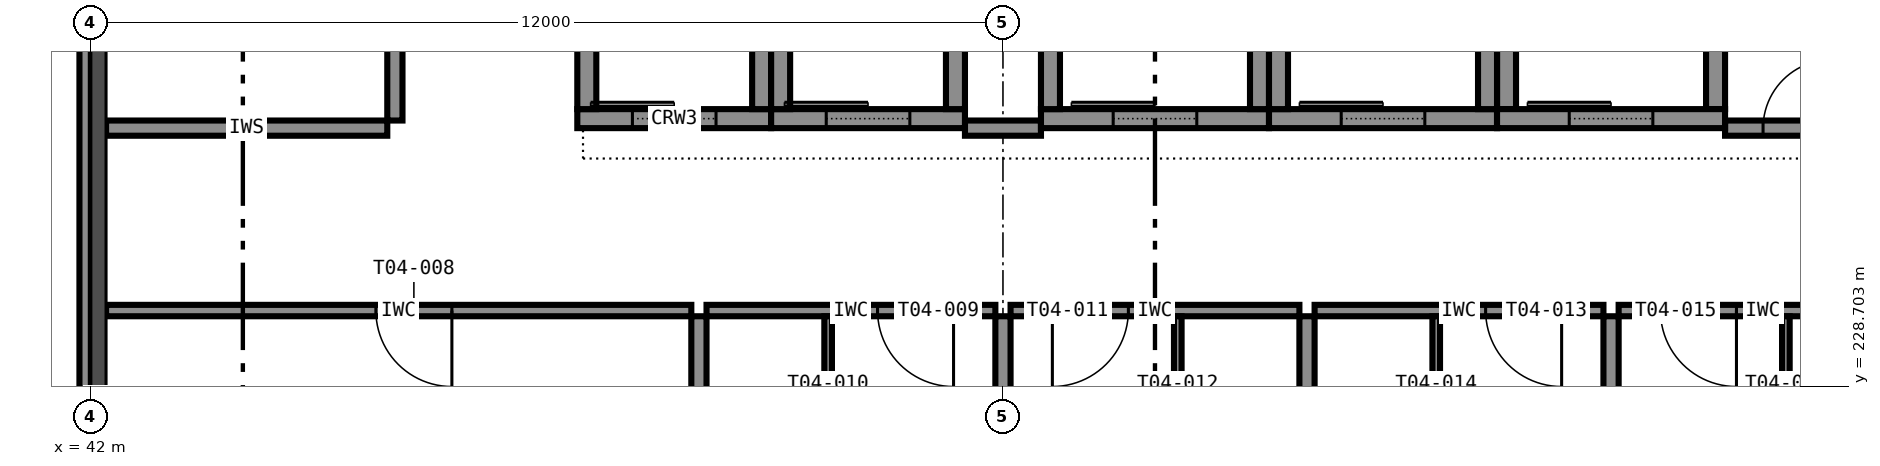
"""IFC4 building model, lengths in metres.
Left out: names, types, materials, properties, quantities, classifications, styles, units other than length and angle.
Written with IfcOpenShell. Run it as: python <this file> out.ifc"""

import sys

from ifc_helpers import new_model, si_unit, direction, frame, frame_2d, origin, place, context, subcontext, project, spatial, rectangle, extrude, element, fill, save


model = new_model("IFC4")
c1 = context("Model", 3, precision=1e-05, world=origin(), true_north=direction((0.0, 1.0)))
c2 = subcontext(c1, "Body", "Model", "MODEL_VIEW")
j1 = project(units=[si_unit("LENGTHUNIT", "METRE"), si_unit("PLANEANGLEUNIT", "RADIAN")], contexts=[c1])
p1 = place(None, origin())
s1 = spatial("IfcSite", under=j1, at=p1, CompositionType="ELEMENT")
p2 = place(p1, origin())
s2 = spatial("IfcBuilding", under=s1, at=p2, CompositionType="ELEMENT")
p3 = place(p2, frame((0.0, 0.0, 21.0)))
s3 = spatial("IfcBuildingStorey", under=s2, at=p3, CompositionType="ELEMENT", Elevation=21.0)
p4 = place(p3, frame((54.5, 232.225, 0.0), z_axis=(0.0, 0.0, 1.0), x_axis=(1.0, 0.0, 0.0)))
e1 = element("IfcWall", 1, at=p4, inside=s3, PredefinedType="SHEAR", context=c2, shape_type="SweptSolid", body=[
    extrude(rectangle(XDim=3.0, YDim=0.25, at=frame_2d((1.5, 0.0))), origin(), (0.0, 0.0, 1.0), 3.6),
])
p5 = place(p4, frame((0.95, 0.0, 0.0)))
e2 = element("IfcOpeningElement", 2, at=p5, cuts=e1, PredefinedType="OPENING", context=c2, shape_type="SweptSolid", body=[
    extrude(rectangle(XDim=1.1, YDim=2.1, at=frame_2d((0.55, 1.05))), frame((0.0, 0.135, 0.0), z_axis=(0.0, -1.0, 0.0), x_axis=(1.0, 0.0, 0.0)), (0.0, 0.0, 1.0), 0.27),
])
for number, where, z_axis, x_axis in (
    (3, (54.625, 232.35, 0.0), (0.0, 0.0, 1.0), (0.0, 1.0, 0.0)),
    (4, (57.375, 232.35, 0.0), (0.0, 0.0, 1.0), (0.0, 1.0, 0.0)),
):
    element("IfcWall", number, at=place(p3, frame(where, z_axis=z_axis, x_axis=x_axis)), inside=s3, PredefinedType="SHEAR", context=c2, shape_type="SweptSolid", body=[
        extrude(rectangle(XDim=3.3, YDim=0.25, at=frame_2d((1.65, 0.0))), origin(), (0.0, 0.0, 1.0), 3.6),
    ])
p6 = place(p3, frame((57.5, 232.225, 0.0), z_axis=(0.0, 0.0, 1.0), x_axis=(1.0, 0.0, 0.0)))
e5 = element("IfcWall", 5, at=p6, inside=s3, PredefinedType="SHEAR", context=c2, shape_type="SweptSolid", body=[
    extrude(rectangle(XDim=3.0, YDim=0.25, at=frame_2d((1.5, 0.0))), origin(), (0.0, 0.0, 1.0), 3.6),
])
p7 = place(p6, frame((0.95, 0.0, 0.0)))
e6 = element("IfcOpeningElement", 6, at=p7, cuts=e5, PredefinedType="OPENING", context=c2, shape_type="SweptSolid", body=[
    extrude(rectangle(XDim=1.1, YDim=2.1, at=frame_2d((0.55, 1.05))), frame((0.0, 0.135, 0.0), z_axis=(0.0, -1.0, 0.0), x_axis=(1.0, 0.0, 0.0)), (0.0, 0.0, 1.0), 0.27),
])
for number, where, z_axis, x_axis in (
    (7, (57.625, 232.35, 0.0), (0.0, 0.0, 1.0), (0.0, 1.0, 0.0)),
    (8, (60.375, 232.35, 0.0), (0.0, 0.0, 1.0), (0.0, 1.0, 0.0)),
):
    element("IfcWall", number, at=place(p3, frame(where, z_axis=z_axis, x_axis=x_axis)), inside=s3, PredefinedType="SHEAR", context=c2, shape_type="SweptSolid", body=[
        extrude(rectangle(XDim=3.3, YDim=0.25, at=frame_2d((1.65, 0.0))), origin(), (0.0, 0.0, 1.0), 3.6),
    ])
p8 = place(p3, frame((60.5, 232.225, 0.0), z_axis=(0.0, 0.0, 1.0), x_axis=(1.0, 0.0, 0.0)))
e9 = element("IfcWall", 9, at=p8, inside=s3, PredefinedType="SHEAR", context=c2, shape_type="SweptSolid", body=[
    extrude(rectangle(XDim=3.0, YDim=0.25, at=frame_2d((1.5, 0.0))), origin(), (0.0, 0.0, 1.0), 3.6),
])
p9 = place(p8, frame((0.95, 0.0, 0.0)))
e10 = element("IfcOpeningElement", 10, at=p9, cuts=e9, PredefinedType="OPENING", context=c2, shape_type="SweptSolid", body=[
    extrude(rectangle(XDim=1.1, YDim=2.1, at=frame_2d((0.55, 1.05))), frame((0.0, 0.135, 0.0), z_axis=(0.0, -1.0, 0.0), x_axis=(1.0, 0.0, 0.0)), (0.0, 0.0, 1.0), 0.27),
])
for number, where, z_axis, x_axis in (
    (11, (60.625, 232.35, 0.0), (0.0, 0.0, 1.0), (0.0, 1.0, 0.0)),
    (12, (63.375, 232.35, 0.0), (0.0, 0.0, 1.0), (0.0, 1.0, 0.0)),
):
    element("IfcWall", number, at=place(p3, frame(where, z_axis=z_axis, x_axis=x_axis)), inside=s3, PredefinedType="SHEAR", context=c2, shape_type="SweptSolid", body=[
        extrude(rectangle(XDim=3.3, YDim=0.25, at=frame_2d((1.65, 0.0))), origin(), (0.0, 0.0, 1.0), 3.6),
    ])
p10 = place(p3, frame((48.4, 232.225, 0.0), z_axis=(0.0, 0.0, 1.0), x_axis=(1.0, 0.0, 0.0)))
e13 = element("IfcWall", 13, at=p10, inside=s3, PredefinedType="SHEAR", context=c2, shape_type="SweptSolid", body=[
    extrude(rectangle(XDim=2.55, YDim=0.25, at=frame_2d((1.275, 0.0))), origin(), (0.0, 0.0, 1.0), 3.6),
])
p11 = place(p10, frame((0.725, 0.0, 0.0)))
e14 = element("IfcOpeningElement", 14, at=p11, cuts=e13, PredefinedType="OPENING", context=c2, shape_type="SweptSolid", body=[
    extrude(rectangle(XDim=1.1, YDim=2.1, at=frame_2d((0.55, 1.05))), frame((0.0, 0.135, 0.0), z_axis=(0.0, -1.0, 0.0), x_axis=(1.0, 0.0, 0.0)), (0.0, 0.0, 1.0), 0.27),
])
for number, where, z_axis, x_axis in (
    (15, (48.525, 232.35, 0.0), (0.0, 0.0, 1.0), (0.0, 1.0, 0.0)),
    (16, (50.825, 232.35, 0.0), (0.0, 0.0, 1.0), (0.0, 1.0, 0.0)),
):
    element("IfcWall", number, at=place(p3, frame(where, z_axis=z_axis, x_axis=x_axis)), inside=s3, PredefinedType="SHEAR", context=c2, shape_type="SweptSolid", body=[
        extrude(rectangle(XDim=3.3, YDim=0.25, at=frame_2d((1.65, 0.0))), origin(), (0.0, 0.0, 1.0), 3.6),
    ])
p12 = place(p3, frame((50.95, 232.225, 0.0), z_axis=(0.0, 0.0, 1.0), x_axis=(1.0, 0.0, 0.0)))
e17 = element("IfcWall", 17, at=p12, inside=s3, PredefinedType="SHEAR", context=c2, shape_type="SweptSolid", body=[
    extrude(rectangle(XDim=2.55, YDim=0.25, at=frame_2d((1.275, 0.0))), origin(), (0.0, 0.0, 1.0), 3.6),
])
p13 = place(p12, frame((0.725, 0.0, 0.0)))
e18 = element("IfcOpeningElement", 18, at=p13, cuts=e17, PredefinedType="OPENING", context=c2, shape_type="SweptSolid", body=[
    extrude(rectangle(XDim=1.1, YDim=2.1, at=frame_2d((0.55, 1.05))), frame((0.0, 0.135, 0.0), z_axis=(0.0, -1.0, 0.0), x_axis=(1.0, 0.0, 0.0)), (0.0, 0.0, 1.0), 0.27),
])
for number, where, z_axis, x_axis in (
    (19, (51.075, 232.35, 0.0), (0.0, 0.0, 1.0), (0.0, 1.0, 0.0)),
    (20, (53.375, 232.35, 0.0), (0.0, 0.0, 1.0), (0.0, 1.0, 0.0)),
):
    element("IfcWall", number, at=place(p3, frame(where, z_axis=z_axis, x_axis=x_axis)), inside=s3, PredefinedType="SHEAR", context=c2, shape_type="SweptSolid", body=[
        extrude(rectangle(XDim=3.3, YDim=0.25, at=frame_2d((1.65, 0.0))), origin(), (0.0, 0.0, 1.0), 3.6),
    ])
p14 = place(p3, frame((41.925, 233.55, 3.4), z_axis=(0.0, 0.0, 1.0), x_axis=(0.0, -1.0, 0.0)))
e21 = element("IfcWall", 21, at=p14, inside=s3, PredefinedType="STANDARD", context=c2, shape_type="SweptSolid", body=[
    extrude(rectangle(XDim=11.1, YDim=0.15, at=frame_2d((5.55, 0.0))), origin(), (0.0, 0.0, 1.0), 0.2),
])
p15 = place(p3, frame((42.2, 232.1, 0.0), z_axis=(0.0, 0.0, 1.0), x_axis=(1.0, 0.0, 0.0)))
e22 = element("IfcWall", 22, at=p15, inside=s3, PredefinedType="PARTITIONING", context=c2, shape_type="SweptSolid", body=[
    extrude(rectangle(XDim=3.7, YDim=0.2, at=frame_2d((1.85, 0.0))), origin(), (0.0, 0.0, 1.0), 3.4),
])
p16 = place(p3, frame((53.5, 232.1, 0.0), z_axis=(0.0, 0.0, 1.0), x_axis=(1.0, 0.0, 0.0)))
e23 = element("IfcWall", 23, at=p16, inside=s3, PredefinedType="PARTITIONING", context=c2, shape_type="SweptSolid", body=[
    extrude(rectangle(XDim=1.0, YDim=0.2, at=frame_2d((0.5, 0.0))), origin(), (0.0, 0.0, 1.0), 3.4),
])
p17 = place(p3, frame((63.5, 232.1, 0.0), z_axis=(0.0, 0.0, 1.0), x_axis=(1.0, 0.0, 0.0)))
e24 = element("IfcWall", 24, at=p17, inside=s3, PredefinedType="PARTITIONING", context=c2, shape_type="SweptSolid", body=[
    extrude(rectangle(XDim=1.9, YDim=0.2, at=frame_2d((0.95, 0.0))), origin(), (0.0, 0.0, 1.0), 3.4),
])
p18 = place(p17, frame((0.5, 0.0, 0.0)))
e25 = element("IfcOpeningElement", 25, at=p18, cuts=e24, PredefinedType="OPENING", context=c2, shape_type="SweptSolid", body=[
    extrude(rectangle(XDim=0.9, YDim=2.1, at=frame_2d((0.45, 1.05))), frame((0.0, 0.11, 0.0), z_axis=(0.0, -1.0, 0.0), x_axis=(1.0, 0.0, 0.0)), (0.0, 0.0, 1.0), 0.22),
])
p19 = place(p3, frame((46.0, 232.2, 0.0), z_axis=(0.0, 0.0, 1.0), x_axis=(0.0, 1.0, 0.0)))
e26 = element("IfcWall", 26, at=p19, inside=s3, PredefinedType="PARTITIONING", context=c2, shape_type="SweptSolid", body=[
    extrude(rectangle(XDim=3.6, YDim=0.2, at=frame_2d((1.8, 0.0))), origin(), (0.0, 0.0, 1.0), 3.4),
])
p20 = place(p19, frame((1.35, 0.0, 0.0)))
e27 = element("IfcOpeningElement", 27, at=p20, cuts=e26, PredefinedType="OPENING", context=c2, shape_type="SweptSolid", body=[
    extrude(rectangle(XDim=0.9, YDim=2.1, at=frame_2d((0.45, 1.05))), frame((0.0, 0.11, 0.0), z_axis=(0.0, -1.0, 0.0), x_axis=(1.0, 0.0, 0.0)), (0.0, 0.0, 1.0), 0.22),
])
p21 = place(p3, frame((49.9, 229.7, 0.0), z_axis=(0.0, 0.0, 1.0), x_axis=(-1.0, 0.0, 0.0)))
e28 = element("IfcWall", 28, at=p21, inside=s3, PredefinedType="PARTITIONING", context=c2, shape_type="SweptSolid", body=[
    extrude(rectangle(XDim=7.7, YDim=0.15, at=frame_2d((3.85, 0.0))), origin(), (0.0, 0.0, 1.0), 3.4),
])
p22 = place(p21, frame((3.15, 0.0, 0.0)))
e29 = element("IfcOpeningElement", 29, at=p22, cuts=e28, PredefinedType="OPENING", context=c2, shape_type="SweptSolid", body=[
    extrude(rectangle(XDim=1.0, YDim=2.1, at=frame_2d((0.5, 1.05))), frame((0.0, 0.085, 0.0), z_axis=(0.0, -1.0, 0.0), x_axis=(1.0, 0.0, 0.0)), (0.0, 0.0, 1.0), 0.17),
])
p23 = place(p3, frame((53.9, 229.7, 0.0), z_axis=(0.0, 0.0, 1.0), x_axis=(-1.0, 0.0, 0.0)))
e30 = element("IfcWall", 30, at=p23, inside=s3, PredefinedType="PARTITIONING", context=c2, shape_type="SweptSolid", body=[
    extrude(rectangle(XDim=3.8, YDim=0.15, at=frame_2d((1.9, 0.0))), origin(), (0.0, 0.0, 1.0), 3.4),
])
p24 = place(p23, frame((0.55, 0.0, 0.0)))
e31 = element("IfcOpeningElement", 31, at=p24, cuts=e30, PredefinedType="OPENING", context=c2, shape_type="SweptSolid", body=[
    extrude(rectangle(XDim=1.0, YDim=2.1, at=frame_2d((0.5, 1.05))), frame((0.0, 0.085, 0.0), z_axis=(0.0, -1.0, 0.0), x_axis=(1.0, 0.0, 0.0)), (0.0, 0.0, 1.0), 0.17),
])
p25 = place(p3, frame((51.7, 229.625, 0.0), z_axis=(0.0, 0.0, 1.0), x_axis=(0.0, -1.0, 0.0)))
e32 = element("IfcWall", 32, at=p25, inside=s3, PredefinedType="PARTITIONING", context=c2, shape_type="SweptSolid", body=[
    extrude(rectangle(XDim=2.875, YDim=0.1, at=frame_2d((1.438, 0.0))), origin(), (0.0, 0.0, 1.0), 3.4),
])
p26 = place(p25, frame((1.038, 0.0, 0.0)))
e33 = element("IfcOpeningElement", 33, at=p26, cuts=e32, PredefinedType="OPENING", context=c2, shape_type="SweptSolid", body=[
    extrude(rectangle(XDim=0.8, YDim=2.1, at=frame_2d((0.4, 1.05))), frame((0.0, 0.06, 0.0), z_axis=(0.0, -1.0, 0.0), x_axis=(1.0, 0.0, 0.0)), (0.0, 0.0, 1.0), 0.12),
])
p27 = place(p3, frame((57.9, 229.7, 0.0), z_axis=(0.0, 0.0, 1.0), x_axis=(-1.0, 0.0, 0.0)))
e34 = element("IfcWall", 34, at=p27, inside=s3, PredefinedType="PARTITIONING", context=c2, shape_type="SweptSolid", body=[
    extrude(rectangle(XDim=3.8, YDim=0.15, at=frame_2d((1.9, 0.0))), origin(), (0.0, 0.0, 1.0), 3.4),
])
p28 = place(p27, frame((2.25, 0.0, 0.0)))
e35 = element("IfcOpeningElement", 35, at=p28, cuts=e34, PredefinedType="OPENING", context=c2, shape_type="SweptSolid", body=[
    extrude(rectangle(XDim=1.0, YDim=2.1, at=frame_2d((0.5, 1.05))), frame((0.0, 0.085, 0.0), z_axis=(0.0, -1.0, 0.0), x_axis=(1.0, 0.0, 0.0)), (0.0, 0.0, 1.0), 0.17),
])
p29 = place(p3, frame((56.3, 226.75, 0.0), z_axis=(0.0, 0.0, 1.0), x_axis=(0.0, 1.0, 0.0)))
e36 = element("IfcWall", 36, at=p29, inside=s3, PredefinedType="PARTITIONING", context=c2, shape_type="SweptSolid", body=[
    extrude(rectangle(XDim=2.875, YDim=0.1, at=frame_2d((1.438, 0.0))), origin(), (0.0, 0.0, 1.0), 3.4),
])
p30 = place(p29, frame((1.038, 0.0, 0.0)))
e37 = element("IfcOpeningElement", 37, at=p30, cuts=e36, PredefinedType="OPENING", context=c2, shape_type="SweptSolid", body=[
    extrude(rectangle(XDim=0.8, YDim=2.1, at=frame_2d((0.4, 1.05))), frame((0.0, 0.06, 0.0), z_axis=(0.0, -1.0, 0.0), x_axis=(1.0, 0.0, 0.0)), (0.0, 0.0, 1.0), 0.12),
])
p31 = place(p3, frame((61.9, 229.7, 0.0), z_axis=(0.0, 0.0, 1.0), x_axis=(-1.0, 0.0, 0.0)))
e38 = element("IfcWall", 38, at=p31, inside=s3, PredefinedType="PARTITIONING", context=c2, shape_type="SweptSolid", body=[
    extrude(rectangle(XDim=3.8, YDim=0.15, at=frame_2d((1.9, 0.0))), origin(), (0.0, 0.0, 1.0), 3.4),
])
p32 = place(p31, frame((0.55, 0.0, 0.0)))
e39 = element("IfcOpeningElement", 39, at=p32, cuts=e38, PredefinedType="OPENING", context=c2, shape_type="SweptSolid", body=[
    extrude(rectangle(XDim=1.0, YDim=2.1, at=frame_2d((0.5, 1.05))), frame((0.0, 0.085, 0.0), z_axis=(0.0, -1.0, 0.0), x_axis=(1.0, 0.0, 0.0)), (0.0, 0.0, 1.0), 0.17),
])
p33 = place(p3, frame((59.7, 229.625, 0.0), z_axis=(0.0, 0.0, 1.0), x_axis=(0.0, -1.0, 0.0)))
e40 = element("IfcWall", 40, at=p33, inside=s3, PredefinedType="PARTITIONING", context=c2, shape_type="SweptSolid", body=[
    extrude(rectangle(XDim=2.875, YDim=0.1, at=frame_2d((1.438, 0.0))), origin(), (0.0, 0.0, 1.0), 3.4),
])
p34 = place(p33, frame((1.038, 0.0, 0.0)))
e41 = element("IfcOpeningElement", 41, at=p34, cuts=e40, PredefinedType="OPENING", context=c2, shape_type="SweptSolid", body=[
    extrude(rectangle(XDim=0.8, YDim=2.1, at=frame_2d((0.4, 1.05))), frame((0.0, 0.06, 0.0), z_axis=(0.0, -1.0, 0.0), x_axis=(1.0, 0.0, 0.0)), (0.0, 0.0, 1.0), 0.12),
])
p35 = place(p3, frame((65.9, 229.7, 0.0), z_axis=(0.0, 0.0, 1.0), x_axis=(-1.0, 0.0, 0.0)))
e42 = element("IfcWall", 42, at=p35, inside=s3, PredefinedType="PARTITIONING", context=c2, shape_type="SweptSolid", body=[
    extrude(rectangle(XDim=3.8, YDim=0.15, at=frame_2d((1.9, 0.0))), origin(), (0.0, 0.0, 1.0), 3.4),
])
p36 = place(p35, frame((2.25, 0.0, 0.0)))
e43 = element("IfcOpeningElement", 43, at=p36, cuts=e42, PredefinedType="OPENING", context=c2, shape_type="SweptSolid", body=[
    extrude(rectangle(XDim=1.0, YDim=2.1, at=frame_2d((0.5, 1.05))), frame((0.0, 0.085, 0.0), z_axis=(0.0, -1.0, 0.0), x_axis=(1.0, 0.0, 0.0)), (0.0, 0.0, 1.0), 0.17),
])
p37 = place(p3, frame((64.3, 226.75, 0.0), z_axis=(0.0, 0.0, 1.0), x_axis=(0.0, 1.0, 0.0)))
e44 = element("IfcWall", 44, at=p37, inside=s3, PredefinedType="PARTITIONING", context=c2, shape_type="SweptSolid", body=[
    extrude(rectangle(XDim=2.875, YDim=0.1, at=frame_2d((1.438, 0.0))), origin(), (0.0, 0.0, 1.0), 3.4),
])
p38 = place(p37, frame((1.038, 0.0, 0.0)))
e45 = element("IfcOpeningElement", 45, at=p38, cuts=e44, PredefinedType="OPENING", context=c2, shape_type="SweptSolid", body=[
    extrude(rectangle(XDim=0.8, YDim=2.1, at=frame_2d((0.4, 1.05))), frame((0.0, 0.06, 0.0), z_axis=(0.0, -1.0, 0.0), x_axis=(1.0, 0.0, 0.0)), (0.0, 0.0, 1.0), 0.12),
])
p39 = place(p3, frame((50.0, 222.3, 0.0), z_axis=(0.0, 0.0, 1.0), x_axis=(0.0, 1.0, 0.0)))
e46 = element("IfcWall", 46, at=p39, inside=s3, PredefinedType="PARTITIONING", context=c2, shape_type="SweptSolid", body=[
    extrude(rectangle(XDim=7.325, YDim=0.2, at=frame_2d((3.663, 0.0))), origin(), (0.0, 0.0, 1.0), 3.4),
])
p40 = place(p3, frame((54.0, 222.45, 0.0), z_axis=(0.0, 0.0, 1.0), x_axis=(0.0, 1.0, 0.0)))
e47 = element("IfcWall", 47, at=p40, inside=s3, PredefinedType="PARTITIONING", context=c2, shape_type="SweptSolid", body=[
    extrude(rectangle(XDim=7.175, YDim=0.2, at=frame_2d((3.587, 0.0))), origin(), (0.0, 0.0, 1.0), 2.6),
])
for number, where, z_axis, x_axis in (
    (48, (58.0, 222.3, 0.0), (0.0, 0.0, 1.0), (0.0, 1.0, 0.0)),
    (49, (62.0, 222.3, 0.0), (0.0, 0.0, 1.0), (0.0, 1.0, 0.0)),
):
    element("IfcWall", number, at=place(p3, frame(where, z_axis=z_axis, x_axis=x_axis)), inside=s3, PredefinedType="PARTITIONING", context=c2, shape_type="SweptSolid", body=[
        extrude(rectangle(XDim=7.325, YDim=0.2, at=frame_2d((3.663, 0.0))), origin(), (0.0, 0.0, 1.0), 3.4),
    ])
p41 = place(p18, origin())
e50 = element("IfcDoor", 50, at=p41, inside=s3, OperationType="SINGLE_SWING_RIGHT", PredefinedType="DOOR", context=c2, shape_type="SweptSolid", body=[
    extrude(rectangle(XDim=0.9, YDim=2.1, at=frame_2d((0.45, 1.05))), frame((0.0, 0.025, 0.0), z_axis=(0.0, -1.0, 0.0), x_axis=(1.0, 0.0, 0.0)), (0.0, 0.0, 1.0), 0.05),
])
fill(e25, e50)
p42 = place(p22, origin())
e51 = element("IfcDoor", 51, at=p42, inside=s3, OperationType="SINGLE_SWING_LEFT", PredefinedType="DOOR", context=c2, shape_type="SweptSolid", body=[
    extrude(rectangle(XDim=1.0, YDim=2.1, at=frame_2d((0.5, 1.05))), frame((0.0, 0.025, 0.0), z_axis=(0.0, -1.0, 0.0), x_axis=(1.0, 0.0, 0.0)), (0.0, 0.0, 1.0), 0.05),
])
fill(e29, e51)
p43 = place(p24, origin())
e52 = element("IfcDoor", 52, at=p43, inside=s3, OperationType="SINGLE_SWING_LEFT", PredefinedType="DOOR", context=c2, shape_type="SweptSolid", body=[
    extrude(rectangle(XDim=1.0, YDim=2.1, at=frame_2d((0.5, 1.05))), frame((0.0, 0.025, 0.0), z_axis=(0.0, -1.0, 0.0), x_axis=(1.0, 0.0, 0.0)), (0.0, 0.0, 1.0), 0.05),
])
fill(e31, e52)
p44 = place(p28, origin())
e53 = element("IfcDoor", 53, at=p44, inside=s3, OperationType="SINGLE_SWING_RIGHT", PredefinedType="DOOR", context=c2, shape_type="SweptSolid", body=[
    extrude(rectangle(XDim=1.0, YDim=2.1, at=frame_2d((0.5, 1.05))), frame((0.0, 0.025, 0.0), z_axis=(0.0, -1.0, 0.0), x_axis=(1.0, 0.0, 0.0)), (0.0, 0.0, 1.0), 0.05),
])
fill(e35, e53)
p45 = place(p32, origin())
e54 = element("IfcDoor", 54, at=p45, inside=s3, OperationType="SINGLE_SWING_LEFT", PredefinedType="DOOR", context=c2, shape_type="SweptSolid", body=[
    extrude(rectangle(XDim=1.0, YDim=2.1, at=frame_2d((0.5, 1.05))), frame((0.0, 0.025, 0.0), z_axis=(0.0, -1.0, 0.0), x_axis=(1.0, 0.0, 0.0)), (0.0, 0.0, 1.0), 0.05),
])
fill(e39, e54)
p46 = place(p36, origin())
e55 = element("IfcDoor", 55, at=p46, inside=s3, OperationType="SINGLE_SWING_LEFT", PredefinedType="DOOR", context=c2, shape_type="SweptSolid", body=[
    extrude(rectangle(XDim=1.0, YDim=2.1, at=frame_2d((0.5, 1.05))), frame((0.0, 0.025, 0.0), z_axis=(0.0, -1.0, 0.0), x_axis=(1.0, 0.0, 0.0)), (0.0, 0.0, 1.0), 0.05),
])
fill(e43, e55)
p47 = place(p5, origin())
e56 = element("IfcDoor", 56, at=p47, inside=s3, OperationType="SLIDING_TO_LEFT", PredefinedType="DOOR", context=c2, shape_type="SweptSolid", body=[
    extrude(rectangle(XDim=1.1, YDim=2.1, at=frame_2d((0.55, 1.05))), frame((0.0, 0.025, 0.0), z_axis=(0.0, -1.0, 0.0), x_axis=(1.0, 0.0, 0.0)), (0.0, 0.0, 1.0), 0.05),
])
fill(e2, e56)
p48 = place(p7, origin())
e57 = element("IfcDoor", 57, at=p48, inside=s3, OperationType="SLIDING_TO_LEFT", PredefinedType="DOOR", context=c2, shape_type="SweptSolid", body=[
    extrude(rectangle(XDim=1.1, YDim=2.1, at=frame_2d((0.55, 1.05))), frame((0.0, 0.025, 0.0), z_axis=(0.0, -1.0, 0.0), x_axis=(1.0, 0.0, 0.0)), (0.0, 0.0, 1.0), 0.05),
])
fill(e6, e57)
p49 = place(p9, origin())
e58 = element("IfcDoor", 58, at=p49, inside=s3, OperationType="SLIDING_TO_LEFT", PredefinedType="DOOR", context=c2, shape_type="SweptSolid", body=[
    extrude(rectangle(XDim=1.1, YDim=2.1, at=frame_2d((0.55, 1.05))), frame((0.0, 0.025, 0.0), z_axis=(0.0, -1.0, 0.0), x_axis=(1.0, 0.0, 0.0)), (0.0, 0.0, 1.0), 0.05),
])
fill(e10, e58)
p50 = place(p11, origin())
e59 = element("IfcDoor", 59, at=p50, inside=s3, OperationType="SLIDING_TO_LEFT", PredefinedType="DOOR", context=c2, shape_type="SweptSolid", body=[
    extrude(rectangle(XDim=1.1, YDim=2.1, at=frame_2d((0.55, 1.05))), frame((0.0, 0.025, 0.0), z_axis=(0.0, -1.0, 0.0), x_axis=(1.0, 0.0, 0.0)), (0.0, 0.0, 1.0), 0.05),
])
fill(e14, e59)
p51 = place(p13, origin())
e60 = element("IfcDoor", 60, at=p51, inside=s3, OperationType="SLIDING_TO_LEFT", PredefinedType="DOOR", context=c2, shape_type="SweptSolid", body=[
    extrude(rectangle(XDim=1.1, YDim=2.1, at=frame_2d((0.55, 1.05))), frame((0.0, 0.025, 0.0), z_axis=(0.0, -1.0, 0.0), x_axis=(1.0, 0.0, 0.0)), (0.0, 0.0, 1.0), 0.05),
])
fill(e18, e60)
save(model, sys.argv[1])
